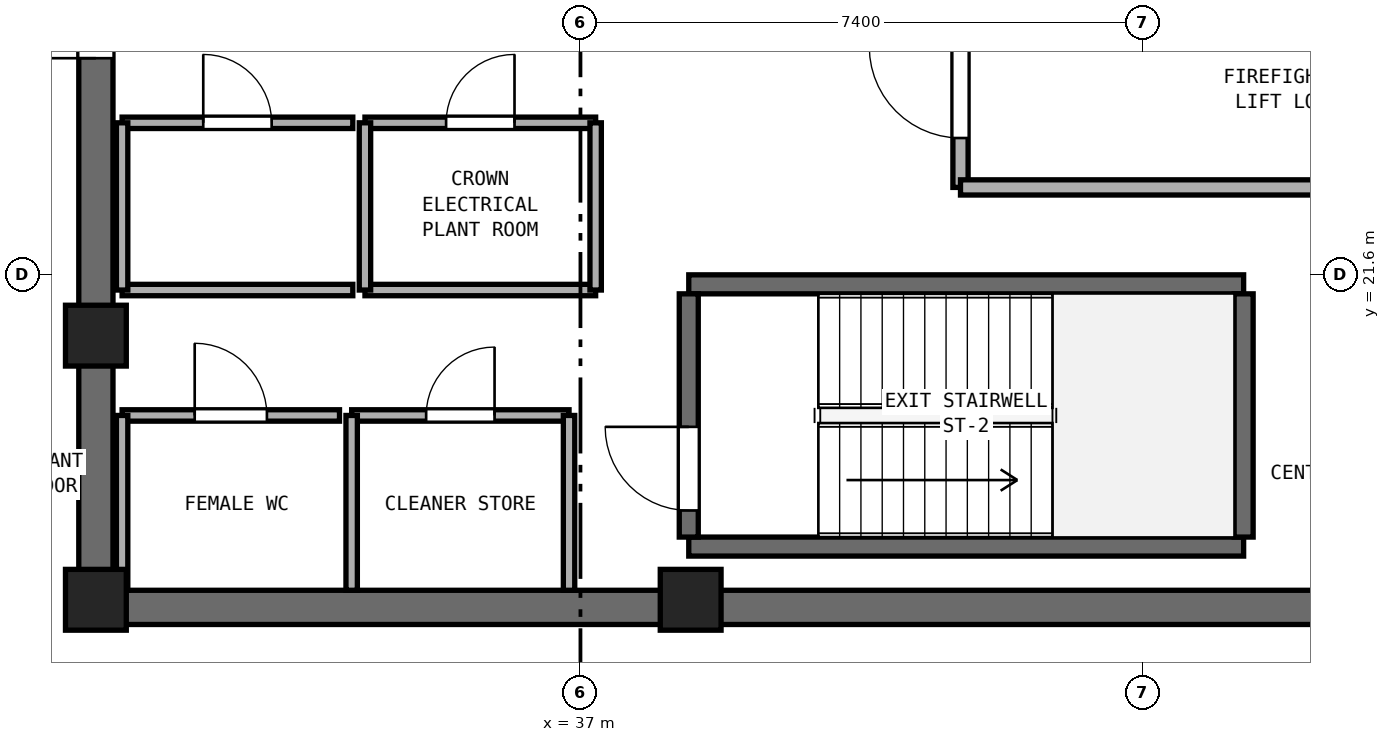
"""IFC4 building model, lengths in metres.
Left out: names, types, materials, properties, quantities, classifications, styles, units other than length and angle.
Written with IfcOpenShell. Run it as: python <this file> out.ifc"""

import sys

from ifc_helpers import new_model, si_unit, direction, frame, frame_2d, origin, origin_2d, place, context, subcontext, project, spatial, rectangle, extrude, element, fill, save


model = new_model("IFC4")
c1 = context("Model", 3, precision=1e-05, world=origin(), true_north=direction((0.0, 1.0)))
c2 = subcontext(c1, "Body", "Model", "MODEL_VIEW")
j1 = project(units=[si_unit("LENGTHUNIT", "METRE"), si_unit("PLANEANGLEUNIT", "RADIAN")], contexts=[c1])
p1 = place(None, origin())
s1 = spatial("IfcSite", under=j1, at=p1, CompositionType="ELEMENT")
p2 = place(p1, origin())
s2 = spatial("IfcBuilding", under=s1, at=p2, CompositionType="ELEMENT")
p3 = place(p2, frame((0.0, 0.0, 317.4)))
s3 = spatial("IfcBuildingStorey", under=s2, at=p3, CompositionType="ELEMENT", Elevation=317.4)
p4 = place(p3, frame((30.4, 17.225, 0.0), z_axis=(0.0, 0.0, 1.0), x_axis=(1.0, 0.0, 0.0)))
e1 = element("IfcWall", 1, at=p4, inside=s3, PredefinedType="SHEAR", context=c2, shape_type="SweptSolid", body=[
    extrude(rectangle(XDim=18.2, YDim=0.45, at=frame_2d((9.1, 0.0))), origin(), (0.0, 0.0, 1.0), 3.72),
])
p5 = place(p3, frame((30.625, 17.45, 0.0), z_axis=(0.0, 0.0, 1.0), x_axis=(0.0, 1.0, 0.0)))
e2 = element("IfcWall", 2, at=p5, inside=s3, PredefinedType="SHEAR", context=c2, shape_type="SweptSolid", body=[
    extrude(rectangle(XDim=15.5, YDim=0.45, at=frame_2d((7.75, 0.0))), origin(), (0.0, 0.0, 1.0), 3.72),
])
p6 = place(p5, frame((7.0, 0.0, 0.0)))
e3 = element("IfcOpeningElement", 3, at=p6, cuts=e2, PredefinedType="OPENING", context=c2, shape_type="SweptSolid", body=[
    extrude(rectangle(XDim=1.5, YDim=2.15, at=frame_2d((0.75, 1.075))), frame((0.0, 0.235, 0.0), z_axis=(0.0, -1.0, 0.0), x_axis=(1.0, 0.0, 0.0)), (0.0, 0.0, 1.0), 0.47),
])
for number, where, z_axis, x_axis in (
    (4, (30.625, 17.325, 0.0), (0.0, 0.0, 1.0), (1.0, 0.0, 0.0)),
    (5, (38.45, 17.325, 0.0), (0.0, 0.0, 1.0), (1.0, 0.0, 0.0)),
    (6, (30.625, 20.8, 0.0), (0.0, 0.0, 1.0), (1.0, 0.0, 0.0)),
):
    element("IfcColumn", number, at=place(p3, frame(where, z_axis=z_axis, x_axis=x_axis)), inside=s3, PredefinedType="PILASTER", context=c2, shape_type="SweptSolid", body=[
        extrude(rectangle(XDim=0.8, YDim=0.8, at=origin_2d()), origin(), (0.0, 0.0, 1.0), 4.0),
    ])
for number, where, z_axis, x_axis in (
    (7, (38.425, 18.025, 0.0), (0.0, 0.0, 1.0), (1.0, 0.0, 0.0)),
    (8, (38.425, 21.475, 0.0), (0.0, 0.0, 1.0), (1.0, 0.0, 0.0)),
):
    element("IfcWall", number, at=place(p3, frame(where, z_axis=z_axis, x_axis=x_axis)), inside=s3, PredefinedType="SHEAR", context=c2, shape_type="SweptSolid", body=[
        extrude(rectangle(XDim=7.3, YDim=0.25, at=frame_2d((3.65, 0.0))), origin(), (0.0, 0.0, 1.0), 3.72),
    ])
p7 = place(p3, frame((38.425, 18.15, 0.0), z_axis=(0.0, 0.0, 1.0), x_axis=(0.0, 1.0, 0.0)))
e9 = element("IfcWall", 9, at=p7, inside=s3, PredefinedType="SHEAR", context=c2, shape_type="SweptSolid", body=[
    extrude(rectangle(XDim=3.2, YDim=0.25, at=frame_2d((1.6, 0.0))), origin(), (0.0, 0.0, 1.0), 3.72),
])
p8 = place(p7, frame((0.35, 0.0, 0.0)))
e10 = element("IfcOpeningElement", 10, at=p8, cuts=e9, PredefinedType="OPENING", context=c2, shape_type="SweptSolid", body=[
    extrude(rectangle(XDim=1.1, YDim=2.15, at=frame_2d((0.55, 1.075))), frame((0.0, 0.135, 0.0), z_axis=(0.0, -1.0, 0.0), x_axis=(1.0, 0.0, 0.0)), (0.0, 0.0, 1.0), 0.27),
])
p9 = place(p3, frame((45.725, 18.15, 0.0), z_axis=(0.0, 0.0, 1.0), x_axis=(0.0, 1.0, 0.0)))
e11 = element("IfcWall", 11, at=p9, inside=s3, PredefinedType="SHEAR", context=c2, shape_type="SweptSolid", body=[
    extrude(rectangle(XDim=3.2, YDim=0.25, at=frame_2d((1.6, 0.0))), origin(), (0.0, 0.0, 1.0), 3.72),
])
p10 = place(p3, frame((42.0, 22.75, 0.0), z_axis=(0.0, 0.0, 1.0), x_axis=(0.0, 1.0, 0.0)))
e12 = element("IfcWall", 12, at=p10, inside=s3, PredefinedType="SOLIDWALL", context=c2, shape_type="SweptSolid", body=[
    extrude(rectangle(XDim=6.05, YDim=0.2, at=frame_2d((3.025, 0.0))), origin(), (0.0, 0.0, 1.0), 3.72),
])
p11 = place(p10, frame((0.65, 0.0, 0.0)))
e13 = element("IfcOpeningElement", 13, at=p11, cuts=e12, PredefinedType="OPENING", context=c2, shape_type="SweptSolid", body=[
    extrude(rectangle(XDim=1.2, YDim=2.15, at=frame_2d((0.6, 1.075))), frame((0.0, 0.11, 0.0), z_axis=(0.0, -1.0, 0.0), x_axis=(1.0, 0.0, 0.0)), (0.0, 0.0, 1.0), 0.22),
])
p12 = place(p3, frame((42.0, 22.75, 0.0), z_axis=(0.0, 0.0, 1.0), x_axis=(1.0, 0.0, 0.0)))
e14 = element("IfcWall", 14, at=p12, inside=s3, PredefinedType="SOLIDWALL", context=c2, shape_type="SweptSolid", body=[
    extrude(rectangle(XDim=6.15, YDim=0.2, at=frame_2d((3.075, 0.0))), origin(), (0.0, 0.0, 1.0), 3.72),
])
p13 = place(p3, frame((30.97, 19.75, 0.0), z_axis=(0.0, 0.0, 1.0), x_axis=(1.0, 0.0, 0.0)))
e15 = element("IfcWall", 15, at=p13, inside=s3, PredefinedType="PARTITIONING", context=c2, shape_type="SweptSolid", body=[
    extrude(rectangle(XDim=2.86, YDim=0.15, at=frame_2d((1.43, 0.0))), origin(), (0.0, 0.0, 1.0), 3.72),
])
p14 = place(p13, frame((0.955, 0.0, 0.0)))
e16 = element("IfcOpeningElement", 16, at=p14, cuts=e15, PredefinedType="OPENING", context=c2, shape_type="SweptSolid", body=[
    extrude(rectangle(XDim=0.95, YDim=2.1, at=frame_2d((0.475, 1.05))), frame((0.0, 0.085, 0.0), z_axis=(0.0, -1.0, 0.0), x_axis=(1.0, 0.0, 0.0)), (0.0, 0.0, 1.0), 0.17),
])
p15 = place(p3, frame((30.97, 17.45, 0.0), z_axis=(0.0, 0.0, 1.0), x_axis=(0.0, 1.0, 0.0)))
e17 = element("IfcWall", 17, at=p15, inside=s3, PredefinedType="PARTITIONING", context=c2, shape_type="SweptSolid", body=[
    extrude(rectangle(XDim=2.3, YDim=0.15, at=frame_2d((1.15, 0.0))), origin(), (0.0, 0.0, 1.0), 2.82),
])
p16 = place(p3, frame((33.99, 19.75, 0.0), z_axis=(0.0, 0.0, 1.0), x_axis=(1.0, 0.0, 0.0)))
e18 = element("IfcWall", 18, at=p16, inside=s3, PredefinedType="PARTITIONING", context=c2, shape_type="SweptSolid", body=[
    extrude(rectangle(XDim=2.86, YDim=0.15, at=frame_2d((1.43, 0.0))), origin(), (0.0, 0.0, 1.0), 3.72),
])
p17 = place(p16, frame((0.98, 0.0, 0.0)))
e19 = element("IfcOpeningElement", 19, at=p17, cuts=e18, PredefinedType="OPENING", context=c2, shape_type="SweptSolid", body=[
    extrude(rectangle(XDim=0.9, YDim=2.1, at=frame_2d((0.45, 1.05))), frame((0.0, 0.085, 0.0), z_axis=(0.0, -1.0, 0.0), x_axis=(1.0, 0.0, 0.0)), (0.0, 0.0, 1.0), 0.17),
])
for number, where, z_axis, x_axis in (
    (20, (33.99, 17.45, 0.0), (0.0, 0.0, 1.0), (0.0, 1.0, 0.0)),
    (21, (36.85, 17.45, 0.0), (0.0, 0.0, 1.0), (0.0, 1.0, 0.0)),
):
    element("IfcWall", number, at=place(p3, frame(where, z_axis=z_axis, x_axis=x_axis)), inside=s3, PredefinedType="PARTITIONING", context=c2, shape_type="SweptSolid", body=[
        extrude(rectangle(XDim=2.3, YDim=0.15, at=frame_2d((1.15, 0.0))), origin(), (0.0, 0.0, 1.0), 3.72),
    ])
p18 = place(p3, frame((30.97, 21.4, 0.0), z_axis=(0.0, 0.0, 1.0), x_axis=(1.0, 0.0, 0.0)))
e22 = element("IfcWall", 22, at=p18, inside=s3, PredefinedType="PARTITIONING", context=c2, shape_type="SweptSolid", body=[
    extrude(rectangle(XDim=3.035, YDim=0.15, at=frame_2d((1.518, 0.0))), origin(), (0.0, 0.0, 1.0), 3.72),
])
p19 = place(p3, frame((30.97, 23.6, 0.0), z_axis=(0.0, 0.0, 1.0), x_axis=(1.0, 0.0, 0.0)))
e23 = element("IfcWall", 23, at=p19, inside=s3, PredefinedType="PARTITIONING", context=c2, shape_type="SweptSolid", body=[
    extrude(rectangle(XDim=3.035, YDim=0.15, at=frame_2d((1.518, 0.0))), origin(), (0.0, 0.0, 1.0), 3.72),
])
p20 = place(p19, frame((1.067, 0.0, 0.0)))
e24 = element("IfcOpeningElement", 24, at=p20, cuts=e23, PredefinedType="OPENING", context=c2, shape_type="SweptSolid", body=[
    extrude(rectangle(XDim=0.9, YDim=2.1, at=frame_2d((0.45, 1.05))), frame((0.0, 0.085, 0.0), z_axis=(0.0, -1.0, 0.0), x_axis=(1.0, 0.0, 0.0)), (0.0, 0.0, 1.0), 0.17),
])
p21 = place(p3, frame((30.97, 21.4, 0.0), z_axis=(0.0, 0.0, 1.0), x_axis=(0.0, 1.0, 0.0)))
e25 = element("IfcWall", 25, at=p21, inside=s3, PredefinedType="PARTITIONING", context=c2, shape_type="SweptSolid", body=[
    extrude(rectangle(XDim=2.2, YDim=0.15, at=frame_2d((1.1, 0.0))), origin(), (0.0, 0.0, 1.0), 2.82),
])
p22 = place(p3, frame((34.165, 21.4, 0.0), z_axis=(0.0, 0.0, 1.0), x_axis=(1.0, 0.0, 0.0)))
e26 = element("IfcWall", 26, at=p22, inside=s3, PredefinedType="PARTITIONING", context=c2, shape_type="SweptSolid", body=[
    extrude(rectangle(XDim=3.035, YDim=0.15, at=frame_2d((1.518, 0.0))), origin(), (0.0, 0.0, 1.0), 3.72),
])
p23 = place(p3, frame((34.165, 23.6, 0.0), z_axis=(0.0, 0.0, 1.0), x_axis=(1.0, 0.0, 0.0)))
e27 = element("IfcWall", 27, at=p23, inside=s3, PredefinedType="PARTITIONING", context=c2, shape_type="SweptSolid", body=[
    extrude(rectangle(XDim=3.035, YDim=0.15, at=frame_2d((1.518, 0.0))), origin(), (0.0, 0.0, 1.0), 3.72),
])
p24 = place(p23, frame((1.067, 0.0, 0.0)))
e28 = element("IfcOpeningElement", 28, at=p24, cuts=e27, PredefinedType="OPENING", context=c2, shape_type="SweptSolid", body=[
    extrude(rectangle(XDim=0.9, YDim=2.1, at=frame_2d((0.45, 1.05))), frame((0.0, 0.085, 0.0), z_axis=(0.0, -1.0, 0.0), x_axis=(1.0, 0.0, 0.0)), (0.0, 0.0, 1.0), 0.17),
])
for number, where, z_axis, x_axis in (
    (29, (34.165, 21.4, 0.0), (0.0, 0.0, 1.0), (0.0, 1.0, 0.0)),
    (30, (37.2, 21.4, 0.0), (0.0, 0.0, 1.0), (0.0, 1.0, 0.0)),
):
    element("IfcWall", number, at=place(p3, frame(where, z_axis=z_axis, x_axis=x_axis)), inside=s3, PredefinedType="PARTITIONING", context=c2, shape_type="SweptSolid", body=[
        extrude(rectangle(XDim=2.2, YDim=0.15, at=frame_2d((1.1, 0.0))), origin(), (0.0, 0.0, 1.0), 3.72),
    ])
p25 = place(p8, origin())
e31 = element("IfcDoor", 31, at=p25, inside=s3, OperationType="SINGLE_SWING_RIGHT", PredefinedType="DOOR", context=c2, shape_type="SweptSolid", body=[
    extrude(rectangle(XDim=1.1, YDim=2.15, at=frame_2d((0.55, 1.075))), frame((0.0, 0.025, 0.0), z_axis=(0.0, -1.0, 0.0), x_axis=(1.0, 0.0, 0.0)), (0.0, 0.0, 1.0), 0.05),
])
fill(e10, e31)
p26 = place(p11, origin())
e32 = element("IfcDoor", 32, at=p26, inside=s3, OperationType="SINGLE_SWING_RIGHT", PredefinedType="DOOR", context=c2, shape_type="SweptSolid", body=[
    extrude(rectangle(XDim=1.2, YDim=2.15, at=frame_2d((0.6, 1.075))), frame((0.0, 0.025, 0.0), z_axis=(0.0, -1.0, 0.0), x_axis=(1.0, 0.0, 0.0)), (0.0, 0.0, 1.0), 0.05),
])
fill(e13, e32)
p27 = place(p6, origin())
e33 = element("IfcDoor", 33, at=p27, inside=s3, OperationType="DOUBLE_DOOR_SINGLE_SWING", PredefinedType="DOOR", context=c2, shape_type="SweptSolid", body=[
    extrude(rectangle(XDim=1.5, YDim=2.15, at=frame_2d((0.75, 1.075))), frame((0.0, 0.025, 0.0), z_axis=(0.0, -1.0, 0.0), x_axis=(1.0, 0.0, 0.0)), (0.0, 0.0, 1.0), 0.05),
])
fill(e3, e33)
p28 = place(p14, origin())
e34 = element("IfcDoor", 34, at=p28, inside=s3, OperationType="SINGLE_SWING_LEFT", PredefinedType="DOOR", context=c2, shape_type="SweptSolid", body=[
    extrude(rectangle(XDim=0.95, YDim=2.1, at=frame_2d((0.475, 1.05))), frame((0.0, 0.025, 0.0), z_axis=(0.0, -1.0, 0.0), x_axis=(1.0, 0.0, 0.0)), (0.0, 0.0, 1.0), 0.05),
])
fill(e16, e34)
p29 = place(p17, origin())
e35 = element("IfcDoor", 35, at=p29, inside=s3, OperationType="SINGLE_SWING_RIGHT", PredefinedType="DOOR", context=c2, shape_type="SweptSolid", body=[
    extrude(rectangle(XDim=0.9, YDim=2.1, at=frame_2d((0.45, 1.05))), frame((0.0, 0.025, 0.0), z_axis=(0.0, -1.0, 0.0), x_axis=(1.0, 0.0, 0.0)), (0.0, 0.0, 1.0), 0.05),
])
fill(e19, e35)
p30 = place(p20, origin())
e36 = element("IfcDoor", 36, at=p30, inside=s3, OperationType="SINGLE_SWING_LEFT", PredefinedType="DOOR", context=c2, shape_type="SweptSolid", body=[
    extrude(rectangle(XDim=0.9, YDim=2.1, at=frame_2d((0.45, 1.05))), frame((0.0, 0.025, 0.0), z_axis=(0.0, -1.0, 0.0), x_axis=(1.0, 0.0, 0.0)), (0.0, 0.0, 1.0), 0.05),
])
fill(e24, e36)
p31 = place(p24, origin())
e37 = element("IfcDoor", 37, at=p31, inside=s3, OperationType="SINGLE_SWING_RIGHT", PredefinedType="DOOR", context=c2, shape_type="SweptSolid", body=[
    extrude(rectangle(XDim=0.9, YDim=2.1, at=frame_2d((0.45, 1.05))), frame((0.0, 0.025, 0.0), z_axis=(0.0, -1.0, 0.0), x_axis=(1.0, 0.0, 0.0)), (0.0, 0.0, 1.0), 0.05),
])
fill(e28, e37)
save(model, sys.argv[1])
